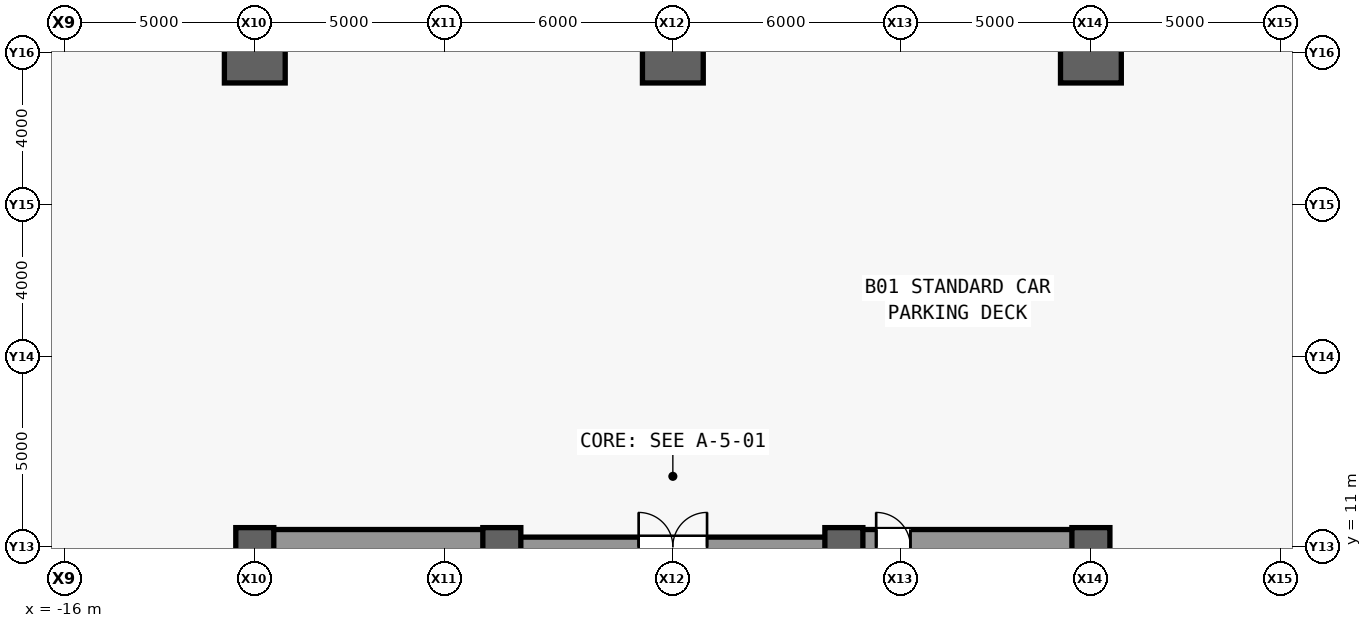
"""IFC4 building model, lengths in metres.
Left out: names, types, materials, properties, quantities, classifications, styles, units other than length and angle.
Written with IfcOpenShell. Run it as: python <this file> out.ifc"""

import sys

from ifc_helpers import new_model, si_unit, direction, frame, frame_2d, origin, origin_2d, place, context, subcontext, project, spatial, rectangle, extrude, source, transform, mapped, element, fill, save


model = new_model("IFC4")
c1 = context("Model", 3, precision=1e-05, world=origin(), true_north=direction((0.0, 1.0)))
c2 = subcontext(c1, "Body", "Model", "MODEL_VIEW")
j1 = project(units=[si_unit("LENGTHUNIT", "METRE"), si_unit("PLANEANGLEUNIT", "RADIAN")], contexts=[c1])
p1 = place(None, origin())
s1 = spatial("IfcSite", under=j1, at=p1, CompositionType="ELEMENT")
p2 = place(p1, origin())
s2 = spatial("IfcBuilding", under=s1, at=p2, CompositionType="ELEMENT")
p3 = place(p2, frame((0.0, 0.0, -4.8)))
s3 = spatial("IfcBuildingStorey", under=s2, at=p3, CompositionType="ELEMENT", Elevation=-4.8)
m1 = source(origin(), c2, "Body", "SweptSolid", [
    extrude(rectangle(XDim=22.0, YDim=0.6, at=frame_2d((11.0, 0.0))), origin(), (0.0, 0.0, 1.0), 4.48),
])
p4 = place(p3, frame((-11.0, -11.0, 0.0), z_axis=(0.0, 0.0, 1.0), x_axis=(0.0, 1.0, 0.0)))
e1 = element("IfcWall", 1, at=p4, inside=s3, PredefinedType="SHEAR", context=c2, shape_type="MappedRepresentation", body=[
    mapped(m1, transform((0.0, 0.0, 0.0), scale=1.0)),
])
m2 = source(origin(), c2, "Body", "SweptSolid", [
    extrude(rectangle(XDim=1.1, YDim=2.2, at=frame_2d((0.55, 1.1))), frame((0.0, 0.31, 0.0), z_axis=(0.0, -1.0, 0.0), x_axis=(1.0, 0.0, 0.0)), (0.0, 0.0, 1.0), 0.62),
])
p5 = place(p4, frame((0.8, 0.0, 0.0)))
e2 = element("IfcOpeningElement", 2, at=p5, cuts=e1, PredefinedType="OPENING", context=c2, shape_type="MappedRepresentation", body=[
    mapped(m2, transform((0.0, 0.0, 0.0), scale=1.0)),
])
p6 = place(p4, frame((12.5, 0.0, 0.0)))
e3 = element("IfcOpeningElement", 3, at=p6, cuts=e1, PredefinedType="OPENING", context=c2, shape_type="MappedRepresentation", body=[
    mapped(m2, transform((0.0, 0.0, 0.0), scale=1.0)),
])
m3 = source(origin(), c2, "Body", "SweptSolid", [
    extrude(rectangle(XDim=0.9, YDim=2.15, at=frame_2d((0.45, 1.075))), frame((0.0, 0.31, 0.0), z_axis=(0.0, -1.0, 0.0), x_axis=(1.0, 0.0, 0.0)), (0.0, 0.0, 1.0), 0.62),
])
p7 = place(p4, frame((7.575, 0.0, 0.0)))
e4 = element("IfcOpeningElement", 4, at=p7, cuts=e1, PredefinedType="OPENING", context=c2, shape_type="MappedRepresentation", body=[
    mapped(m3, transform((0.0, 0.0, 0.0), scale=1.0)),
])
m4 = source(origin(), c2, "Body", "SweptSolid", [
    extrude(rectangle(XDim=1.3, YDim=2.3, at=frame_2d((0.65, 1.15))), frame((0.0, 0.31, 0.0), z_axis=(0.0, -1.0, 0.0), x_axis=(1.0, 0.0, 0.0)), (0.0, 0.0, 1.0), 0.62),
])
p8 = place(p4, frame((2.7, 0.0, 0.0)))
e5 = element("IfcOpeningElement", 5, at=p8, cuts=e1, PredefinedType="OPENING", context=c2, shape_type="MappedRepresentation", body=[
    mapped(m4, transform((0.0, 0.0, 0.0), scale=1.0)),
])
p9 = place(p3, frame((11.0, -11.0, 0.0), z_axis=(0.0, 0.0, 1.0), x_axis=(0.0, 1.0, 0.0)))
e6 = element("IfcWall", 6, at=p9, inside=s3, PredefinedType="SHEAR", context=c2, shape_type="MappedRepresentation", body=[
    mapped(m1, transform((0.0, 0.0, 0.0), scale=1.0)),
])
p10 = place(p9, frame((0.8, 0.0, 0.0)))
e7 = element("IfcOpeningElement", 7, at=p10, cuts=e6, PredefinedType="OPENING", context=c2, shape_type="MappedRepresentation", body=[
    mapped(m2, transform((0.0, 0.0, 0.0), scale=1.0)),
])
p11 = place(p9, frame((7.575, 0.0, 0.0)))
e8 = element("IfcOpeningElement", 8, at=p11, cuts=e6, PredefinedType="OPENING", context=c2, shape_type="MappedRepresentation", body=[
    mapped(m3, transform((0.0, 0.0, 0.0), scale=1.0)),
])
p12 = place(p9, frame((2.7, 0.0, 0.0)))
e9 = element("IfcOpeningElement", 9, at=p12, cuts=e6, PredefinedType="OPENING", context=c2, shape_type="MappedRepresentation", body=[
    mapped(m4, transform((0.0, 0.0, 0.0), scale=1.0)),
])
p13 = place(p9, frame((13.35, 0.0, 0.0)))
e10 = element("IfcOpeningElement", 10, at=p13, cuts=e6, PredefinedType="OPENING", context=c2, shape_type="MappedRepresentation", body=[
    mapped(m4, transform((0.0, 0.0, 0.0), scale=1.0)),
])
m5 = source(origin(), c2, "Body", "SweptSolid", [
    extrude(rectangle(XDim=5.85, YDim=0.9, at=frame_2d((2.925, 0.0))), origin(), (0.0, 0.0, 1.0), 4.48),
])
p14 = place(p3, frame((-10.7, 11.0, 0.0), z_axis=(0.0, 0.0, 1.0), x_axis=(1.0, 0.0, 0.0)))
e11 = element("IfcWall", 11, at=p14, inside=s3, PredefinedType="SHEAR", context=c2, shape_type="MappedRepresentation", body=[
    mapped(m5, transform((0.0, 0.0, 0.0), scale=1.0)),
])
p15 = place(p3, frame((4.85, 11.0, 0.0), z_axis=(0.0, 0.0, 1.0), x_axis=(1.0, 0.0, 0.0)))
e12 = element("IfcWall", 12, at=p15, inside=s3, PredefinedType="SHEAR", context=c2, shape_type="MappedRepresentation", body=[
    mapped(m5, transform((0.0, 0.0, 0.0), scale=1.0)),
])
m6 = source(origin(), c2, "Body", "SweptSolid", [
    extrude(rectangle(XDim=0.9, YDim=2.15, at=frame_2d((0.45, 1.075))), frame((0.0, 0.46, 0.0), z_axis=(0.0, -1.0, 0.0), x_axis=(1.0, 0.0, 0.0)), (0.0, 0.0, 1.0), 0.92),
])
p16 = place(p15, frame((0.5, 0.0, 0.0)))
e13 = element("IfcOpeningElement", 13, at=p16, cuts=e12, PredefinedType="OPENING", context=c2, shape_type="MappedRepresentation", body=[
    mapped(m6, transform((0.0, 0.0, 0.0), scale=1.0)),
])
m7 = source(origin(), c2, "Body", "SweptSolid", [
    extrude(rectangle(XDim=9.2, YDim=0.5, at=frame_2d((4.6, 0.0))), origin(), (0.0, 0.0, 1.0), 4.48),
])
p17 = place(p3, frame((-4.6, 11.0, 0.0), z_axis=(0.0, 0.0, 1.0), x_axis=(1.0, 0.0, 0.0)))
e14 = element("IfcWall", 14, at=p17, inside=s3, PredefinedType="SHEAR", context=c2, shape_type="MappedRepresentation", body=[
    mapped(m7, transform((0.0, 0.0, 0.0), scale=1.0)),
])
m8 = source(origin(), c2, "Body", "SweptSolid", [
    extrude(rectangle(XDim=1.8, YDim=2.25, at=frame_2d((0.9, 1.125))), frame((0.0, 0.26, 0.0), z_axis=(0.0, -1.0, 0.0), x_axis=(1.0, 0.0, 0.0)), (0.0, 0.0, 1.0), 0.52),
])
p18 = place(p17, frame((3.7, 0.0, 0.0)))
e15 = element("IfcOpeningElement", 15, at=p18, cuts=e14, PredefinedType="OPENING", context=c2, shape_type="MappedRepresentation", body=[
    mapped(m8, transform((0.0, 0.0, 0.0), scale=1.0)),
])
m9 = source(origin(), c2, "Body", "SweptSolid", [
    extrude(rectangle(XDim=1.0, YDim=1.0, at=origin_2d()), origin(), (0.0, 0.0, 1.0), 4.8),
])
p19 = place(p3, frame((-11.0, 11.0, 0.0), z_axis=(0.0, 0.0, 1.0), x_axis=(1.0, 0.0, 0.0)))
e16 = element("IfcColumn", 16, at=p19, inside=s3, PredefinedType="COLUMN", context=c2, shape_type="MappedRepresentation", body=[
    mapped(m9, transform((0.0, 0.0, 0.0), scale=1.0)),
])
m10 = source(origin(), c2, "Body", "SweptSolid", [
    extrude(rectangle(XDim=1.6, YDim=1.6, at=origin_2d()), origin(), (0.0, 0.0, 1.0), 4.8),
])
p20 = place(p3, frame((-11.0, 24.0, 0.0), z_axis=(0.0, 0.0, 1.0), x_axis=(1.0, 0.0, 0.0)))
e17 = element("IfcColumn", 17, at=p20, inside=s3, PredefinedType="COLUMN", context=c2, shape_type="MappedRepresentation", body=[
    mapped(m10, transform((0.0, 0.0, 0.0), scale=1.0)),
])
p21 = place(p3, frame((-4.5, 11.0, 0.0), z_axis=(0.0, 0.0, 1.0), x_axis=(1.0, 0.0, 0.0)))
e18 = element("IfcColumn", 18, at=p21, inside=s3, PredefinedType="COLUMN", context=c2, shape_type="MappedRepresentation", body=[
    mapped(m9, transform((0.0, 0.0, 0.0), scale=1.0)),
])
p22 = place(p3, frame((0.0, 24.0, 0.0), z_axis=(0.0, 0.0, 1.0), x_axis=(1.0, 0.0, 0.0)))
e19 = element("IfcColumn", 19, at=p22, inside=s3, PredefinedType="COLUMN", context=c2, shape_type="MappedRepresentation", body=[
    mapped(m10, transform((0.0, 0.0, 0.0), scale=1.0)),
])
for number, where, z_axis, x_axis in (
    (20, (4.5, 11.0, 0.0), (0.0, 0.0, 1.0), (1.0, 0.0, 0.0)),
    (21, (11.0, 11.0, 0.0), (0.0, 0.0, 1.0), (1.0, 0.0, 0.0)),
):
    element("IfcColumn", number, at=place(p3, frame(where, z_axis=z_axis, x_axis=x_axis)), inside=s3, PredefinedType="COLUMN", context=c2, shape_type="MappedRepresentation", body=[
        mapped(m9, transform((0.0, 0.0, 0.0), scale=1.0)),
    ])
p23 = place(p3, frame((11.0, 24.0, 0.0), z_axis=(0.0, 0.0, 1.0), x_axis=(1.0, 0.0, 0.0)))
e22 = element("IfcColumn", 22, at=p23, inside=s3, PredefinedType="COLUMN", context=c2, shape_type="MappedRepresentation", body=[
    mapped(m10, transform((0.0, 0.0, 0.0), scale=1.0)),
])
m11 = source(origin(), c2, "Body", "SweptSolid", [
    extrude(rectangle(XDim=0.9, YDim=2.15, at=frame_2d((0.45, 1.075))), frame((0.0, 0.025, 0.0), z_axis=(0.0, -1.0, 0.0), x_axis=(1.0, 0.0, 0.0)), (0.0, 0.0, 1.0), 0.05),
])
p24 = place(p16, origin())
e23 = element("IfcDoor", 23, at=p24, inside=s3, OperationType="SINGLE_SWING_LEFT", PredefinedType="DOOR", context=c2, shape_type="MappedRepresentation", body=[
    mapped(m11, transform((0.0, 0.0, 0.0), scale=1.0)),
])
fill(e13, e23)
m12 = source(origin(), c2, "Body", "SweptSolid", [
    extrude(rectangle(XDim=1.8, YDim=2.25, at=frame_2d((0.9, 1.125))), frame((0.0, 0.025, 0.0), z_axis=(0.0, -1.0, 0.0), x_axis=(1.0, 0.0, 0.0)), (0.0, 0.0, 1.0), 0.05),
])
p25 = place(p18, origin())
e24 = element("IfcDoor", 24, at=p25, inside=s3, OperationType="SINGLE_SWING_RIGHT", PredefinedType="DOOR", context=c2, shape_type="MappedRepresentation", body=[
    mapped(m12, transform((0.0, 0.0, 0.0), scale=1.0)),
])
fill(e15, e24)
save(model, sys.argv[1])
